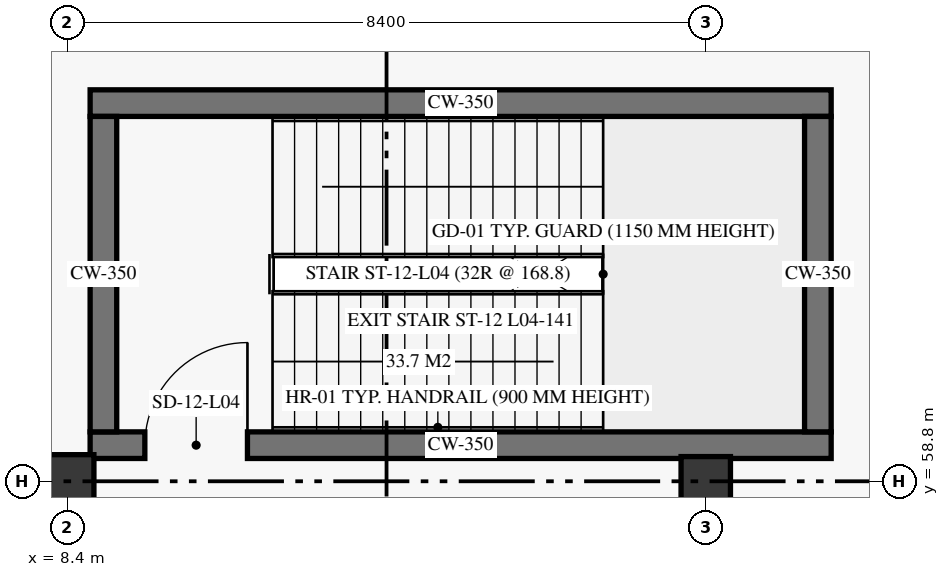
"""IFC4 building model, lengths in metres.
Left out: names, types, materials, properties, quantities, classifications, styles, units other than length and angle.
Written with IfcOpenShell. Run it as: python <this file> out.ifc"""

import sys

from ifc_helpers import new_model, si_unit, direction, frame, frame_2d, origin, origin_2d, place, context, subcontext, project, spatial, rectangle, extrude, element, fill, save


model = new_model("IFC4")
c1 = context("Model", 3, precision=1e-05, world=origin(), true_north=direction((0.0, 1.0)))
c2 = subcontext(c1, "Body", "Model", "MODEL_VIEW")
j1 = project(units=[si_unit("LENGTHUNIT", "METRE"), si_unit("PLANEANGLEUNIT", "RADIAN")], contexts=[c1])
p1 = place(None, origin())
s1 = spatial("IfcSite", under=j1, at=p1, CompositionType="ELEMENT")
p2 = place(p1, origin())
s2 = spatial("IfcBuilding", under=s1, at=p2, CompositionType="ELEMENT")
p3 = place(p2, frame((0.0, 0.0, 16.8)))
s3 = spatial("IfcBuildingStorey", under=s2, at=p3, CompositionType="ELEMENT", Elevation=16.8)
p4 = place(p3, frame((8.4, 58.8, 0.0), z_axis=(0.0, 0.0, 1.0), x_axis=(1.0, 0.0, 0.0)))
e1 = element("IfcColumn", 1, at=p4, inside=s3, PredefinedType="COLUMN", context=c2, shape_type="SweptSolid", body=[
    extrude(rectangle(XDim=0.7, YDim=0.7, at=origin_2d()), origin(), (0.0, 0.0, 1.0), 5.1),
])
p5 = place(p3, frame((16.8, 58.8, 0.0), z_axis=(0.0, 0.0, 1.0), x_axis=(1.0, 0.0, 0.0)))
e2 = element("IfcColumn", 2, at=p5, inside=s3, PredefinedType="COLUMN", context=c2, shape_type="SweptSolid", body=[
    extrude(rectangle(XDim=0.65, YDim=0.65, at=origin_2d()), origin(), (0.0, 0.0, 1.0), 5.1),
])
p6 = place(p3, frame((8.7, 59.275, 0.0), z_axis=(0.0, 0.0, 1.0), x_axis=(1.0, 0.0, 0.0)))
e3 = element("IfcWall", 3, at=p6, inside=s3, PredefinedType="SHEAR", context=c2, shape_type="SweptSolid", body=[
    extrude(rectangle(XDim=9.75, YDim=0.35, at=frame_2d((4.875, 0.0))), origin(), (0.0, 0.0, 1.0), 5.1),
])
p7 = place(p6, frame((0.72, 0.0, 0.0)))
e4 = element("IfcOpeningElement", 4, at=p7, cuts=e3, PredefinedType="OPENING", context=c2, shape_type="SweptSolid", body=[
    extrude(rectangle(XDim=1.35, YDim=2.25, at=frame_2d((0.675, 1.125))), frame((0.0, 0.185, 0.0), z_axis=(0.0, -1.0, 0.0), x_axis=(1.0, 0.0, 0.0)), (0.0, 0.0, 1.0), 0.37),
])
p8 = place(p3, frame((8.7, 63.775, 0.0), z_axis=(0.0, 0.0, 1.0), x_axis=(1.0, 0.0, 0.0)))
e5 = element("IfcWall", 5, at=p8, inside=s3, PredefinedType="SHEAR", context=c2, shape_type="SweptSolid", body=[
    extrude(rectangle(XDim=9.75, YDim=0.35, at=frame_2d((4.875, 0.0))), origin(), (0.0, 0.0, 1.0), 5.1),
])
for number, where, z_axis, x_axis in (
    (6, (8.875, 59.45, 0.0), (0.0, 0.0, 1.0), (0.0, 1.0, 0.0)),
    (7, (18.275, 59.45, 0.0), (0.0, 0.0, 1.0), (0.0, 1.0, 0.0)),
):
    element("IfcWall", number, at=place(p3, frame(where, z_axis=z_axis, x_axis=x_axis)), inside=s3, PredefinedType="SHEAR", context=c2, shape_type="SweptSolid", body=[
        extrude(rectangle(XDim=4.15, YDim=0.35, at=frame_2d((2.075, 0.0))), origin(), (0.0, 0.0, 1.0), 5.1),
    ])
p9 = place(p7, origin())
e8 = element("IfcDoor", 8, at=p9, inside=s3, OperationType="SINGLE_SWING_RIGHT", PredefinedType="DOOR", context=c2, shape_type="SweptSolid", body=[
    extrude(rectangle(XDim=1.35, YDim=2.25, at=frame_2d((0.675, 1.125))), frame((0.0, 0.025, 0.0), z_axis=(0.0, -1.0, 0.0), x_axis=(1.0, 0.0, 0.0)), (0.0, 0.0, 1.0), 0.05),
])
fill(e4, e8)
save(model, sys.argv[1])
